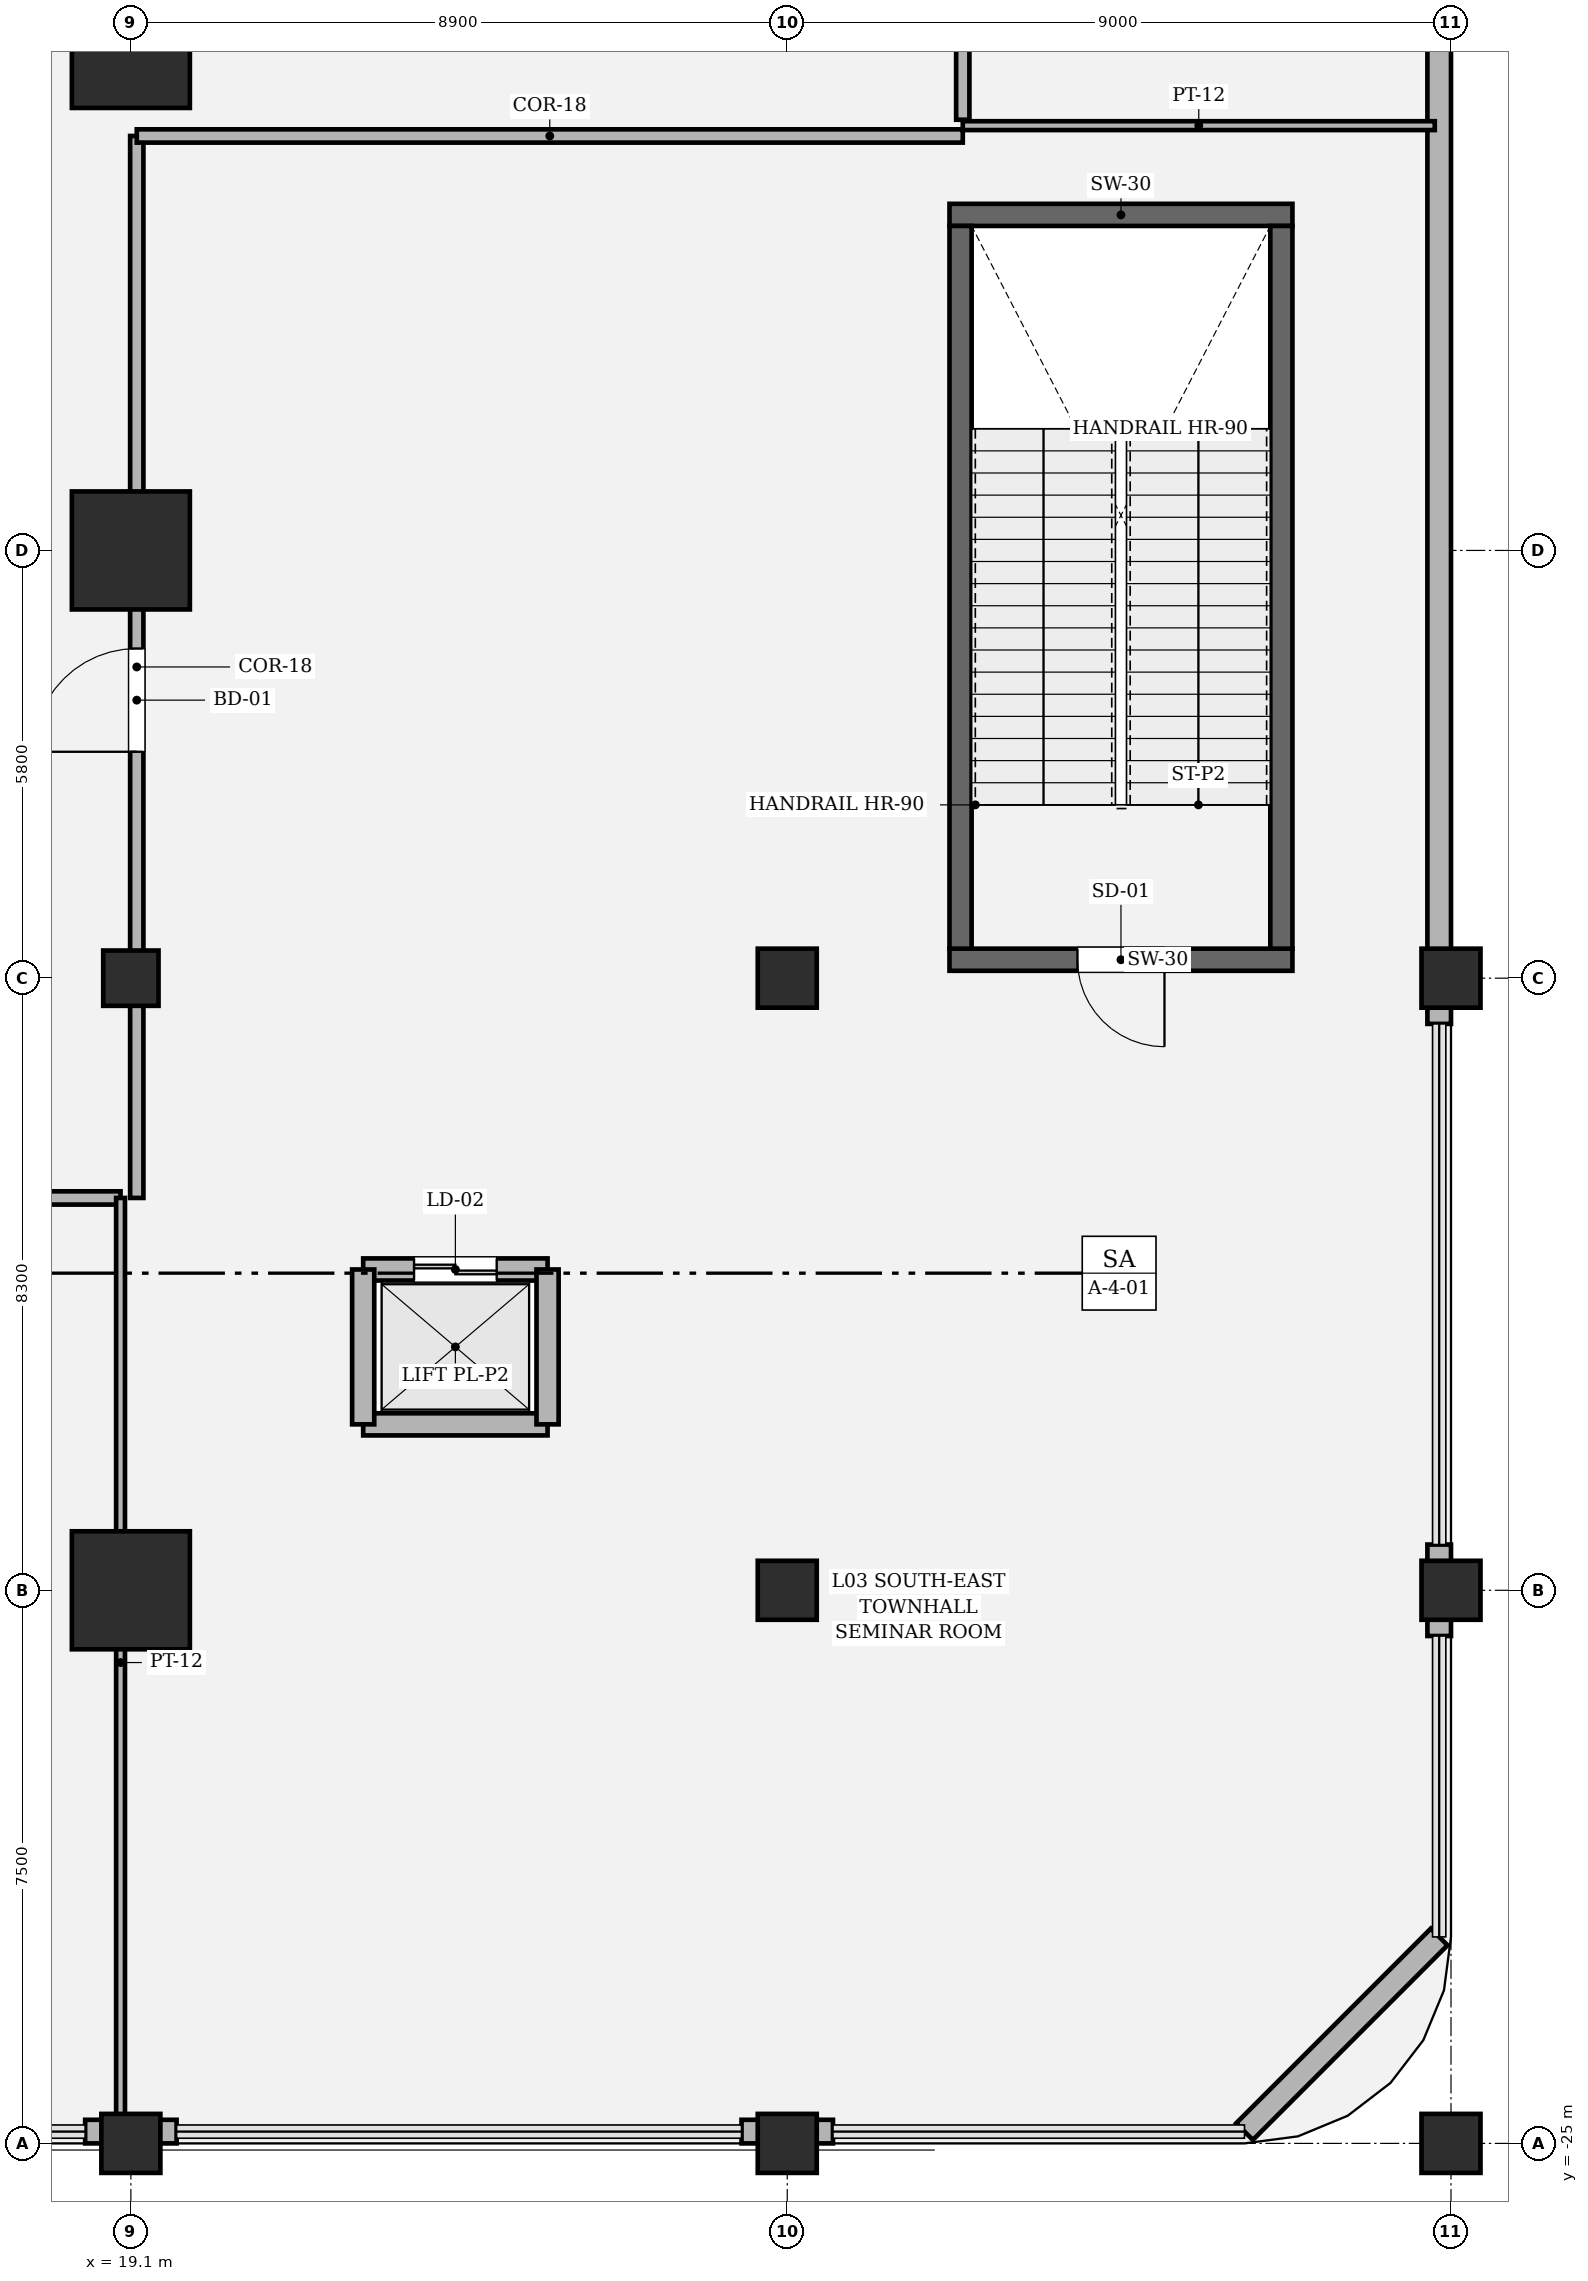
"""IFC4 building model, lengths in metres.
Left out: names, types, materials, properties, quantities, classifications, styles, units other than length and angle.
Written with IfcOpenShell. Run it as: python <this file> out.ifc"""

import sys

from ifc_helpers import new_model, si_unit, direction, frame, frame_2d, origin, origin_2d, place, context, subcontext, project, spatial, rectangle, hollow_rectangle, circle, extrude, element, fill, save


model = new_model("IFC4")
c1 = context("Model", 3, precision=1e-05, world=origin(), true_north=direction((0.0, 1.0)))
c2 = subcontext(c1, "Body", "Model", "MODEL_VIEW")
j1 = project(units=[si_unit("LENGTHUNIT", "METRE"), si_unit("PLANEANGLEUNIT", "RADIAN")], contexts=[c1])
p1 = place(None, origin())
s1 = spatial("IfcSite", under=j1, at=p1, CompositionType="ELEMENT")
p2 = place(p1, origin())
s2 = spatial("IfcBuilding", under=s1, at=p2, CompositionType="ELEMENT")
p3 = place(p2, frame((0.0, 0.0, 16.8)))
s3 = spatial("IfcBuildingStorey", under=s2, at=p3, CompositionType="ELEMENT", Elevation=16.8)
p4 = place(p3, frame((30.2, -8.95, 0.0), z_axis=(0.0, 0.0, 1.0), x_axis=(1.0, 0.0, 0.0)))
e1 = element("IfcWall", 1, at=p4, inside=s3, PredefinedType="SOLIDWALL", context=c2, shape_type="SweptSolid", body=[
    extrude(rectangle(XDim=4.65, YDim=0.3, at=frame_2d((2.325, 0.0))), origin(), (0.0, 0.0, 1.0), 5.4),
])
p5 = place(p4, frame((1.735, 0.0, 0.0)))
e2 = element("IfcOpeningElement", 2, at=p5, cuts=e1, PredefinedType="OPENING", context=c2, shape_type="SweptSolid", body=[
    extrude(rectangle(XDim=1.18, YDim=2.2, at=frame_2d((0.59, 1.1))), frame((0.0, 0.16, 0.0), z_axis=(0.0, -1.0, 0.0), x_axis=(1.0, 0.0, 0.0)), (0.0, 0.0, 1.0), 0.32),
])
p6 = place(p3, frame((34.85, 1.15, 0.0), z_axis=(0.0, 0.0, 1.0), x_axis=(-1.0, 0.0, 0.0)))
e3 = element("IfcWall", 3, at=p6, inside=s3, PredefinedType="SOLIDWALL", context=c2, shape_type="SweptSolid", body=[
    extrude(rectangle(XDim=4.65, YDim=0.3, at=frame_2d((2.325, 0.0))), origin(), (0.0, 0.0, 1.0), 5.4),
])
for number, where, z_axis, x_axis in (
    (4, (30.35, -8.8, 0.0), (0.0, 0.0, 1.0), (0.0, 1.0, 0.0)),
    (5, (34.7, 1.0, 0.0), (0.0, 0.0, 1.0), (0.0, -1.0, 0.0)),
):
    element("IfcWall", number, at=place(p3, frame(where, z_axis=z_axis, x_axis=x_axis)), inside=s3, PredefinedType="SOLIDWALL", context=c2, shape_type="SweptSolid", body=[
        extrude(rectangle(XDim=9.8, YDim=0.3, at=frame_2d((4.9, 0.0))), origin(), (0.0, 0.0, 1.0), 5.4),
    ])
for number, where, z_axis, x_axis in (
    (6, (19.1, -17.5, 0.0), (0.0, 0.0, 1.0), (1.0, 0.0, 0.0)),
    (7, (19.1, -3.4, 0.0), (0.0, 0.0, 1.0), (1.0, 0.0, 0.0)),
    (8, (19.1, 3.4, 0.0), (0.0, 0.0, 1.0), (1.0, 0.0, 0.0)),
):
    element("IfcColumn", number, at=place(p3, frame(where, z_axis=z_axis, x_axis=x_axis)), inside=s3, PredefinedType="COLUMN", context=c2, shape_type="SweptSolid", body=[
        extrude(hollow_rectangle(XDim=1.6, YDim=1.6, WallThickness=0.05, at=origin_2d()), origin(), (0.0, 0.0, 1.0), 5.4),
    ])
for number, where, z_axis, x_axis in (
    (9, (19.1, -25.0, 0.0), (0.0, 0.0, 1.0), (1.0, 0.0, 0.0)),
    (10, (28.0, -25.0, 0.0), (0.0, 0.0, 1.0), (1.0, 0.0, 0.0)),
    (11, (37.0, -25.0, 0.0), (0.0, 0.0, 1.0), (1.0, 0.0, 0.0)),
    (12, (28.0, -17.5, 0.0), (0.0, 0.0, 1.0), (1.0, 0.0, 0.0)),
    (13, (37.0, -17.5, 0.0), (0.0, 0.0, 1.0), (1.0, 0.0, 0.0)),
    (14, (37.0, -9.2, 0.0), (0.0, 0.0, 1.0), (1.0, 0.0, 0.0)),
    (15, (28.0, -9.2, 0.0), (0.0, 0.0, 1.0), (1.0, 0.0, 0.0)),
):
    element("IfcColumn", number, at=place(p3, frame(where, z_axis=z_axis, x_axis=x_axis)), inside=s3, PredefinedType="COLUMN", context=c2, shape_type="SweptSolid", body=[
        extrude(rectangle(XDim=0.8, YDim=0.8, at=origin_2d()), origin(), (0.0, 0.0, 1.0), 5.4),
    ])
p7 = place(p3, frame((19.1, -9.2, 0.0), z_axis=(0.0, 0.0, 1.0), x_axis=(1.0, 0.0, 0.0)))
e16 = element("IfcColumn", 16, at=p7, inside=s3, PredefinedType="PILASTER", context=c2, shape_type="SweptSolid", body=[
    extrude(circle(Radius=0.375, at=origin_2d()), origin(), (0.0, 0.0, 1.0), 5.4),
])
p8 = place(p3, frame((18.48, -24.84, 0.0), z_axis=(0.0, 0.0, 1.0), x_axis=(1.0, 0.0, 0.0)))
e17 = element("IfcWall", 17, at=p8, inside=s3, PredefinedType="SOLIDWALL", context=c2, shape_type="SweptSolid", body=[
    extrude(rectangle(XDim=1.24, YDim=0.32, at=frame_2d((0.62, 0.0))), origin(), (0.0, 0.0, 1.0), 4.314),
])
p9 = place(p3, frame((27.38, -24.84, 0.0), z_axis=(0.0, 0.0, 1.0), x_axis=(1.0, 0.0, 0.0)))
e18 = element("IfcWall", 18, at=p9, inside=s3, PredefinedType="SOLIDWALL", context=c2, shape_type="SweptSolid", body=[
    extrude(rectangle(XDim=1.24, YDim=0.32, at=frame_2d((0.62, 0.0))), origin(), (0.0, 0.0, 1.0), 4.314),
])
p10 = place(p3, frame((36.84, 9.82, 0.0), z_axis=(0.0, 0.0, 1.0), x_axis=(0.0, -1.0, 0.0)))
e19 = element("IfcWall", 19, at=p10, inside=s3, PredefinedType="SOLIDWALL", context=c2, shape_type="SweptSolid", body=[
    extrude(rectangle(XDim=19.64, YDim=0.32, at=frame_2d((9.82, 0.0))), origin(), (0.0, 0.0, 1.0), 4.314),
])
p11 = place(p3, frame((36.84, -16.88, 0.0), z_axis=(0.0, 0.0, 1.0), x_axis=(0.0, -1.0, 0.0)))
e20 = element("IfcWall", 20, at=p11, inside=s3, PredefinedType="SOLIDWALL", context=c2, shape_type="SweptSolid", body=[
    extrude(rectangle(XDim=1.24, YDim=0.32, at=frame_2d((0.62, 0.0))), origin(), (0.0, 0.0, 1.0), 4.314),
])
p12 = place(p3, frame((36.84, -22.2, 0.0), z_axis=(0.0, 0.0, 1.0), x_axis=(-0.707106781187, -0.707106781187, 0.0)))
e21 = element("IfcWall", 21, at=p12, inside=s3, PredefinedType="SOLIDWALL", context=c2, shape_type="SweptSolid", body=[
    extrude(rectangle(XDim=3.734, YDim=0.32, at=frame_2d((1.867, 0.0))), origin(), (0.0, 0.0, 1.0), 4.464),
])
p13 = place(p3, frame((22.25, -13.15, 0.0), z_axis=(0.0, 0.0, 1.0), x_axis=(1.0, 0.0, 0.0)))
e22 = element("IfcWall", 22, at=p13, inside=s3, PredefinedType="SOLIDWALL", context=c2, shape_type="SweptSolid", body=[
    extrude(rectangle(XDim=2.5, YDim=0.3, at=frame_2d((1.25, 0.0))), origin(), (0.0, 0.0, 1.0), 5.02),
])
p14 = place(p13, frame((0.69, 0.0, 0.0)))
e23 = element("IfcOpeningElement", 23, at=p14, cuts=e22, PredefinedType="OPENING", context=c2, shape_type="SweptSolid", body=[
    extrude(rectangle(XDim=1.12, YDim=2.25, at=frame_2d((0.56, 1.125))), frame((0.0, 0.16, 0.0), z_axis=(0.0, -1.0, 0.0), x_axis=(1.0, 0.0, 0.0)), (0.0, 0.0, 1.0), 0.32),
])
p15 = place(p3, frame((22.25, -15.25, 0.0), z_axis=(0.0, 0.0, 1.0), x_axis=(1.0, 0.0, 0.0)))
e24 = element("IfcWall", 24, at=p15, inside=s3, PredefinedType="SOLIDWALL", context=c2, shape_type="SweptSolid", body=[
    extrude(rectangle(XDim=2.5, YDim=0.3, at=frame_2d((1.25, 0.0))), origin(), (0.0, 0.0, 1.0), 5.02),
])
for number, where, z_axis, x_axis in (
    (25, (22.25, -15.25, 0.0), (0.0, 0.0, 1.0), (0.0, 1.0, 0.0)),
    (26, (24.75, -15.25, 0.0), (0.0, 0.0, 1.0), (0.0, 1.0, 0.0)),
):
    element("IfcWall", number, at=place(p3, frame(where, z_axis=z_axis, x_axis=x_axis)), inside=s3, PredefinedType="SOLIDWALL", context=c2, shape_type="SweptSolid", body=[
        extrude(rectangle(XDim=2.1, YDim=0.3, at=frame_2d((1.05, 0.0))), origin(), (0.0, 0.0, 1.0), 5.02),
    ])
p16 = place(p3, frame((-18.96, -12.18, 0.0), z_axis=(0.0, 0.0, 1.0), x_axis=(1.0, 0.0, 0.0)))
e27 = element("IfcWall", 27, at=p16, inside=s3, PredefinedType="PARTITIONING", context=c2, shape_type="SweptSolid", body=[
    extrude(rectangle(XDim=37.92, YDim=0.18, at=frame_2d((18.96, 0.0))), origin(), (0.0, 0.0, 1.0), 4.314),
])
p17 = place(p16, frame((18.435, 0.0, 0.0)))
e28 = element("IfcOpeningElement", 28, at=p17, cuts=e27, PredefinedType="OPENING", context=c2, shape_type="SweptSolid", body=[
    extrude(rectangle(XDim=1.05, YDim=2.2, at=frame_2d((0.525, 1.1))), frame((0.0, 0.1, 0.0), z_axis=(0.0, -1.0, 0.0), x_axis=(1.0, 0.0, 0.0)), (0.0, 0.0, 1.0), 0.2),
])
p18 = place(p3, frame((18.96, -12.18, 0.0), z_axis=(0.0, 0.0, 1.0), x_axis=(0.0, -1.0, 0.0)))
e29 = element("IfcWall", 29, at=p18, inside=s3, PredefinedType="PARTITIONING", context=c2, shape_type="SweptSolid", body=[
    extrude(rectangle(XDim=12.6, YDim=0.12, at=frame_2d((6.3, 0.0))), origin(), (0.0, 0.0, 1.0), 4.314),
])
p19 = place(p3, frame((19.18, -12.18, 0.0), z_axis=(0.0, 0.0, 1.0), x_axis=(0.0, 1.0, 0.0)))
e30 = element("IfcWall", 30, at=p19, inside=s3, PredefinedType="PARTITIONING", context=c2, shape_type="SweptSolid", body=[
    extrude(rectangle(XDim=14.4, YDim=0.18, at=frame_2d((7.2, 0.0))), origin(), (0.0, 0.0, 1.0), 4.314),
])
p20 = place(p19, frame((6.05, 0.0, 0.0)))
e31 = element("IfcOpeningElement", 31, at=p20, cuts=e30, PredefinedType="OPENING", context=c2, shape_type="SweptSolid", body=[
    extrude(rectangle(XDim=1.4, YDim=2.25, at=frame_2d((0.7, 1.125))), frame((0.0, 0.1, 0.0), z_axis=(0.0, -1.0, 0.0), x_axis=(1.0, 0.0, 0.0)), (0.0, 0.0, 1.0), 0.2),
])
p21 = place(p3, frame((19.18, 2.22, 0.0), z_axis=(0.0, 0.0, 1.0), x_axis=(1.0, 0.0, 0.0)))
e32 = element("IfcWall", 32, at=p21, inside=s3, PredefinedType="PARTITIONING", context=c2, shape_type="SweptSolid", body=[
    extrude(rectangle(XDim=11.2, YDim=0.18, at=frame_2d((5.6, 0.0))), origin(), (0.0, 0.0, 1.0), 4.314),
])
p22 = place(p3, frame((30.38, 2.36, 0.0), z_axis=(0.0, 0.0, 1.0), x_axis=(1.0, 0.0, 0.0)))
e33 = element("IfcWall", 33, at=p22, inside=s3, PredefinedType="PARTITIONING", context=c2, shape_type="SweptSolid", body=[
    extrude(rectangle(XDim=6.4, YDim=0.12, at=frame_2d((3.2, 0.0))), origin(), (0.0, 0.0, 1.0), 5.02),
])
p23 = place(p3, frame((30.38, 2.44, 0.0), z_axis=(0.0, 0.0, 1.0), x_axis=(0.0, 1.0, 0.0)))
e34 = element("IfcWall", 34, at=p23, inside=s3, PredefinedType="PARTITIONING", context=c2, shape_type="SweptSolid", body=[
    extrude(rectangle(XDim=3.52, YDim=0.18, at=frame_2d((1.76, 0.0))), origin(), (0.0, 0.0, 1.0), 4.564),
])
p24 = place(p23, frame((1.25, 0.0, 0.0)))
e35 = element("IfcOpeningElement", 35, at=p24, cuts=e34, PredefinedType="OPENING", context=c2, shape_type="SweptSolid", body=[
    extrude(rectangle(XDim=1.02, YDim=2.2, at=frame_2d((0.51, 1.1))), frame((0.0, 0.1, 0.0), z_axis=(0.0, -1.0, 0.0), x_axis=(1.0, 0.0, 0.0)), (0.0, 0.0, 1.0), 0.2),
])
p25 = place(p5, origin())
e36 = element("IfcDoor", 36, at=p25, inside=s3, OperationType="SINGLE_SWING_RIGHT", PredefinedType="DOOR", context=c2, shape_type="SweptSolid", body=[
    extrude(rectangle(XDim=1.18, YDim=2.2, at=frame_2d((0.59, 1.1))), frame((0.0, 0.025, 0.0), z_axis=(0.0, -1.0, 0.0), x_axis=(1.0, 0.0, 0.0)), (0.0, 0.0, 1.0), 0.05),
])
fill(e2, e36)
p26 = place(p14, origin())
e37 = element("IfcDoor", 37, at=p26, inside=s3, OperationType="DOUBLE_DOOR_SLIDING", PredefinedType="DOOR", context=c2, shape_type="SweptSolid", body=[
    extrude(rectangle(XDim=1.12, YDim=2.25, at=frame_2d((0.56, 1.125))), frame((0.0, 0.025, 0.0), z_axis=(0.0, -1.0, 0.0), x_axis=(1.0, 0.0, 0.0)), (0.0, 0.0, 1.0), 0.05),
])
fill(e23, e37)
p27 = place(p20, origin())
e38 = element("IfcDoor", 38, at=p27, inside=s3, OperationType="SINGLE_SWING_LEFT", PredefinedType="DOOR", context=c2, shape_type="SweptSolid", body=[
    extrude(rectangle(XDim=1.4, YDim=2.25, at=frame_2d((0.7, 1.125))), frame((0.0, 0.025, 0.0), z_axis=(0.0, -1.0, 0.0), x_axis=(1.0, 0.0, 0.0)), (0.0, 0.0, 1.0), 0.05),
])
fill(e31, e38)
save(model, sys.argv[1])
